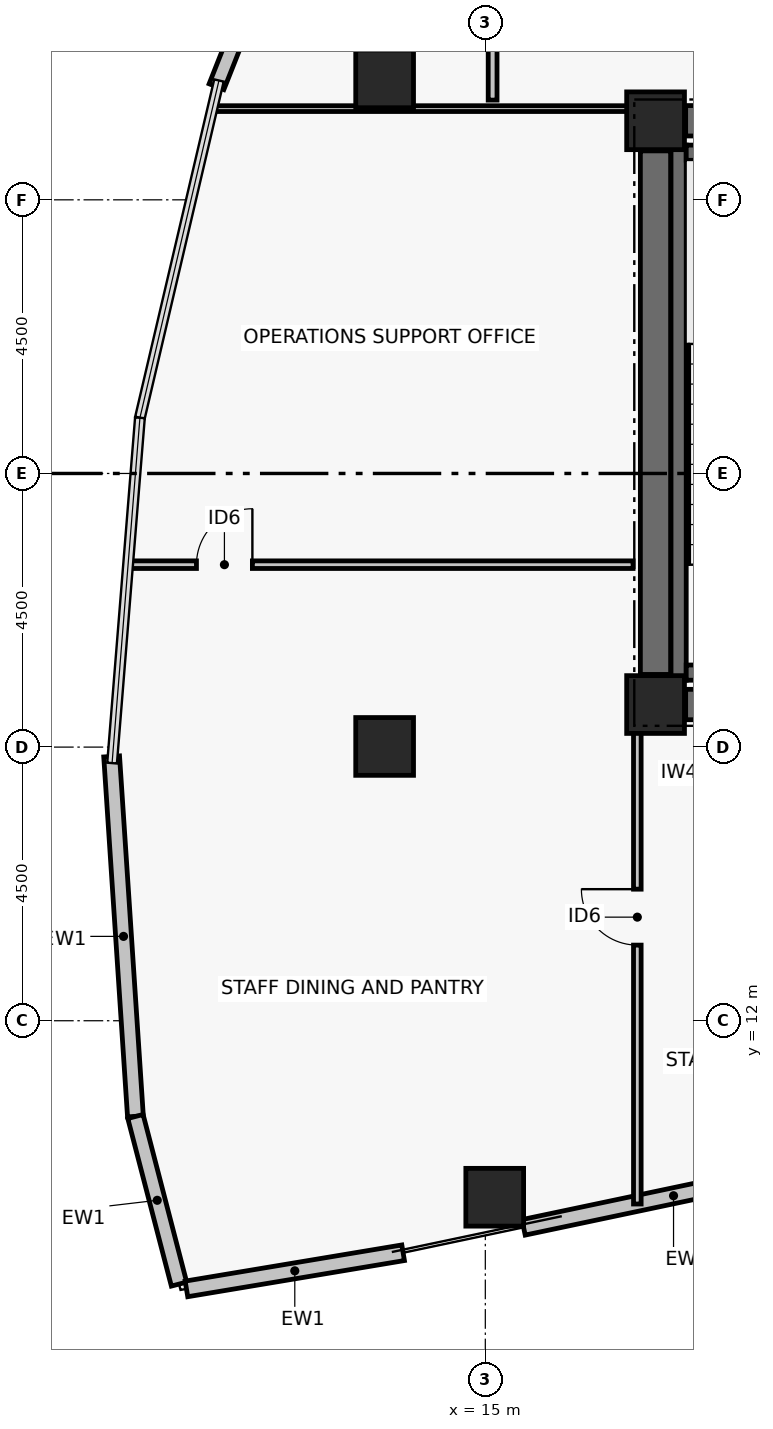
"""IFC4 building model, lengths in metres.
Left out: names, types, materials, properties, quantities, classifications, styles, units other than length and angle.
Written with IfcOpenShell. Run it as: python <this file> out.ifc"""

import sys

from ifc_helpers import new_model, si_unit, direction, frame, frame_2d, origin, origin_2d, place, context, subcontext, project, spatial, rectangle, hollow_rectangle, extrude, element, fill, save


model = new_model("IFC4")
c1 = context("Model", 3, precision=1e-05, world=origin(), true_north=direction((0.0, 1.0)))
c2 = subcontext(c1, "Body", "Model", "MODEL_VIEW")
j1 = project(units=[si_unit("LENGTHUNIT", "METRE"), si_unit("PLANEANGLEUNIT", "RADIAN")], contexts=[c1])
p1 = place(None, origin())
s1 = spatial("IfcSite", under=j1, at=p1, CompositionType="ELEMENT")
p2 = place(p1, origin())
s2 = spatial("IfcBuilding", under=s1, at=p2, CompositionType="ELEMENT")
p3 = place(p2, frame((0.0, 0.0, 180.36)))
s3 = spatial("IfcBuildingStorey", under=s2, at=p3, CompositionType="ELEMENT", Elevation=180.36)
for number, where, z_axis, x_axis in (
    (1, (17.8, 17.2, 0.0), (0.0, 0.0, 1.0), (1.0, 0.0, 0.0)),
    (2, (17.8, 26.8, 0.0), (0.0, 0.0, 1.0), (1.0, 0.0, 0.0)),
):
    element("IfcColumn", number, at=place(p3, frame(where, z_axis=z_axis, x_axis=x_axis)), inside=s3, PredefinedType="COLUMN", context=c2, shape_type="SweptSolid", body=[
        extrude(rectangle(XDim=0.95, YDim=0.95, at=origin_2d()), origin(), (0.0, 0.0, 1.0), 3.72),
    ])
for number, where, z_axis, x_axis in (
    (3, (18.295, 17.2, 0.0), (0.0, 0.0, 1.0), (1.0, 0.0, 0.0)),
    (4, (18.295, 26.8, 0.0), (0.0, 0.0, 1.0), (1.0, 0.0, 0.0)),
):
    element("IfcWall", number, at=place(p3, frame(where, z_axis=z_axis, x_axis=x_axis)), inside=s3, PredefinedType="SHEAR", context=c2, shape_type="SweptSolid", body=[
        extrude(rectangle(XDim=3.26, YDim=0.5, at=frame_2d((1.63, 0.0))), origin(), (0.0, 0.0, 1.0), 3.5),
    ])
p4 = place(p3, frame((17.8, 17.695, 0.0), z_axis=(0.0, 0.0, 1.0), x_axis=(0.0, 1.0, 0.0)))
e5 = element("IfcWall", 5, at=p4, inside=s3, PredefinedType="SHEAR", context=c2, shape_type="SweptSolid", body=[
    extrude(rectangle(XDim=8.61, YDim=0.5, at=frame_2d((4.305, 0.0))), origin(), (0.0, 0.0, 1.0), 3.5),
])
p5 = place(p3, frame((18.179, 17.6, 0.0), z_axis=(0.0, 0.0, 1.0), x_axis=(0.0, 1.0, 0.0)))
e6 = element("IfcWall", 6, at=p5, inside=s3, PredefinedType="SHEAR", context=c2, shape_type="SweptSolid", body=[
    extrude(rectangle(XDim=8.8, YDim=0.25, at=frame_2d((4.4, 0.0))), origin(), (0.0, 0.0, 1.0), 3.5),
])
for number, where, z_axis, x_axis in (
    (7, (18.304, 17.725, 0.0), (0.0, 0.0, 1.0), (1.0, 0.0, 0.0)),
    (8, (18.304, 26.275, 0.0), (0.0, 0.0, 1.0), (1.0, 0.0, 0.0)),
):
    element("IfcWall", number, at=place(p3, frame(where, z_axis=z_axis, x_axis=x_axis)), inside=s3, PredefinedType="SHEAR", context=c2, shape_type="SweptSolid", body=[
        extrude(rectangle(XDim=3.496, YDim=0.25, at=frame_2d((1.748, 0.0))), origin(), (0.0, 0.0, 1.0), 3.5),
    ])
for number, where, z_axis, x_axis in (
    (9, (13.344, 27.489, 0.0), (0.0, 0.0, 1.0), (1.0, 0.0, 0.0)),
    (10, (13.344, 16.511, 0.0), (0.0, 0.0, 1.0), (1.0, 0.0, 0.0)),
    (11, (15.155, 9.097, 0.0), (0.0, 0.0, 1.0), (1.0, 0.0, 0.0)),
):
    element("IfcColumn", number, at=place(p3, frame(where, z_axis=z_axis, x_axis=x_axis)), inside=s3, PredefinedType="COLUMN", context=c2, shape_type="SweptSolid", body=[
        extrude(hollow_rectangle(XDim=0.95, YDim=0.95, WallThickness=0.04, at=origin_2d()), origin(), (0.0, 0.0, 1.0), 3.72),
    ])
p6 = place(p3, frame((10.579, 27.36, 0.0), z_axis=(0.0, 0.0, 1.0), x_axis=(0.367819433119, 0.929897233365, 0.0)))
e12 = element("IfcWall", 12, at=p6, inside=s3, PredefinedType="PARTITIONING", context=c2, shape_type="SweptSolid", body=[
    extrude(rectangle(XDim=5.933, YDim=0.26, at=frame_2d((2.967, 0.0))), origin(), (0.0, 0.0, 1.0), 3.5),
])
p7 = place(p3, frame((9.246, 10.428, 0.0), z_axis=(0.0, 0.0, 1.0), x_axis=(-0.065934416021, 0.997823958814, 0.0)))
e13 = element("IfcWall", 13, at=p7, inside=s3, PredefinedType="PARTITIONING", context=c2, shape_type="SweptSolid", body=[
    extrude(rectangle(XDim=5.932, YDim=0.26, at=frame_2d((2.966, 0.0))), origin(), (0.0, 0.0, 1.0), 3.5),
])
p8 = place(p3, frame((9.963, 7.669, 0.0), z_axis=(0.0, 0.0, 1.0), x_axis=(-0.251601733001, 0.967830857098, 0.0)))
e14 = element("IfcWall", 14, at=p8, inside=s3, PredefinedType="PARTITIONING", context=c2, shape_type="SweptSolid", body=[
    extrude(rectangle(XDim=2.848, YDim=0.26, at=frame_2d((1.424, 0.0))), origin(), (0.0, 0.0, 1.0), 3.5),
])
p9 = place(p3, frame((13.648, 8.184, 0.0), z_axis=(0.0, 0.0, 1.0), x_axis=(-0.986357371246, -0.164618152669, 0.0)))
e15 = element("IfcWall", 15, at=p9, inside=s3, PredefinedType="PARTITIONING", context=c2, shape_type="SweptSolid", body=[
    extrude(rectangle(XDim=3.613, YDim=0.26, at=frame_2d((1.806, 0.0))), origin(), (0.0, 0.0, 1.0), 3.5),
])
p10 = place(p3, frame((20.562, 9.642, 0.0), z_axis=(0.0, 0.0, 1.0), x_axis=(-0.978488082144, -0.206303352137, 0.0)))
e16 = element("IfcWall", 16, at=p10, inside=s3, PredefinedType="PARTITIONING", context=c2, shape_type="SweptSolid", body=[
    extrude(rectangle(XDim=5.041, YDim=0.26, at=frame_2d((2.521, 0.0))), origin(), (0.0, 0.0, 1.0), 3.5),
])
p11 = place(p3, frame((15.12, 28.7, 0.0), z_axis=(0.0, 0.0, 1.0), x_axis=(0.0, -1.0, 0.0)))
e17 = element("IfcWall", 17, at=p11, inside=s3, PredefinedType="PARTITIONING", context=c2, shape_type="SweptSolid", body=[
    extrude(rectangle(XDim=1.56, YDim=0.145, at=frame_2d((0.78, 0.0))), origin(), (0.0, 0.0, 1.0), 2.73),
])
p12 = place(p3, frame((17.5, 8.986, 0.0), z_axis=(0.0, 0.0, 1.0), x_axis=(0.0, 1.0, 0.0)))
e18 = element("IfcWall", 18, at=p12, inside=s3, PredefinedType="PARTITIONING", context=c2, shape_type="SweptSolid", body=[
    extrude(rectangle(XDim=7.844, YDim=0.125, at=frame_2d((3.922, 0.0))), origin(), (0.0, 0.0, 1.0), 2.73),
])
p13 = place(p12, frame((4.257, 0.0, 0.0)))
e19 = element("IfcOpeningElement", 19, at=p13, cuts=e18, PredefinedType="OPENING", context=c2, shape_type="SweptSolid", body=[
    extrude(rectangle(XDim=0.92, YDim=2.05, at=frame_2d((0.46, 1.025))), frame((0.0, 0.073, 0.0), z_axis=(0.0, -1.0, 0.0), x_axis=(1.0, 0.0, 0.0)), (0.0, 0.0, 1.0), 0.145),
])
p14 = place(p3, frame((9.115, 19.5, 0.0), z_axis=(0.0, 0.0, 1.0), x_axis=(1.0, 0.0, 0.0)))
e20 = element("IfcWall", 20, at=p14, inside=s3, PredefinedType="PARTITIONING", context=c2, shape_type="SweptSolid", body=[
    extrude(rectangle(XDim=8.315, YDim=0.125, at=frame_2d((4.158, 0.0))), origin(), (0.0, 0.0, 1.0), 2.63),
])
p15 = place(p14, frame((1.135, 0.0, 0.0)))
e21 = element("IfcOpeningElement", 21, at=p15, cuts=e20, PredefinedType="OPENING", context=c2, shape_type="SweptSolid", body=[
    extrude(rectangle(XDim=0.92, YDim=2.05, at=frame_2d((0.46, 1.025))), frame((0.0, 0.073, 0.0), z_axis=(0.0, -1.0, 0.0), x_axis=(1.0, 0.0, 0.0)), (0.0, 0.0, 1.0), 0.145),
])
p16 = place(p3, frame((10.501, 27.0, 0.0), z_axis=(0.0, 0.0, 1.0), x_axis=(1.0, 0.0, 0.0)))
e22 = element("IfcWall", 22, at=p16, inside=s3, PredefinedType="PARTITIONING", context=c2, shape_type="SweptSolid", body=[
    extrude(rectangle(XDim=6.929, YDim=0.095, at=frame_2d((3.465, 0.0))), origin(), (0.0, 0.0, 1.0), 2.73),
])
p17 = place(p13, origin())
e23 = element("IfcDoor", 23, at=p17, inside=s3, OperationType="SINGLE_SWING_RIGHT", PredefinedType="DOOR", context=c2, shape_type="SweptSolid", body=[
    extrude(rectangle(XDim=0.92, YDim=2.05, at=frame_2d((0.46, 1.025))), frame((0.0, 0.025, 0.0), z_axis=(0.0, -1.0, 0.0), x_axis=(1.0, 0.0, 0.0)), (0.0, 0.0, 1.0), 0.05),
])
fill(e19, e23)
p18 = place(p15, origin())
e24 = element("IfcDoor", 24, at=p18, inside=s3, OperationType="SINGLE_SWING_RIGHT", PredefinedType="DOOR", context=c2, shape_type="SweptSolid", body=[
    extrude(rectangle(XDim=0.92, YDim=2.05, at=frame_2d((0.46, 1.025))), frame((0.0, 0.025, 0.0), z_axis=(0.0, -1.0, 0.0), x_axis=(1.0, 0.0, 0.0)), (0.0, 0.0, 1.0), 0.05),
])
fill(e21, e24)
save(model, sys.argv[1])
